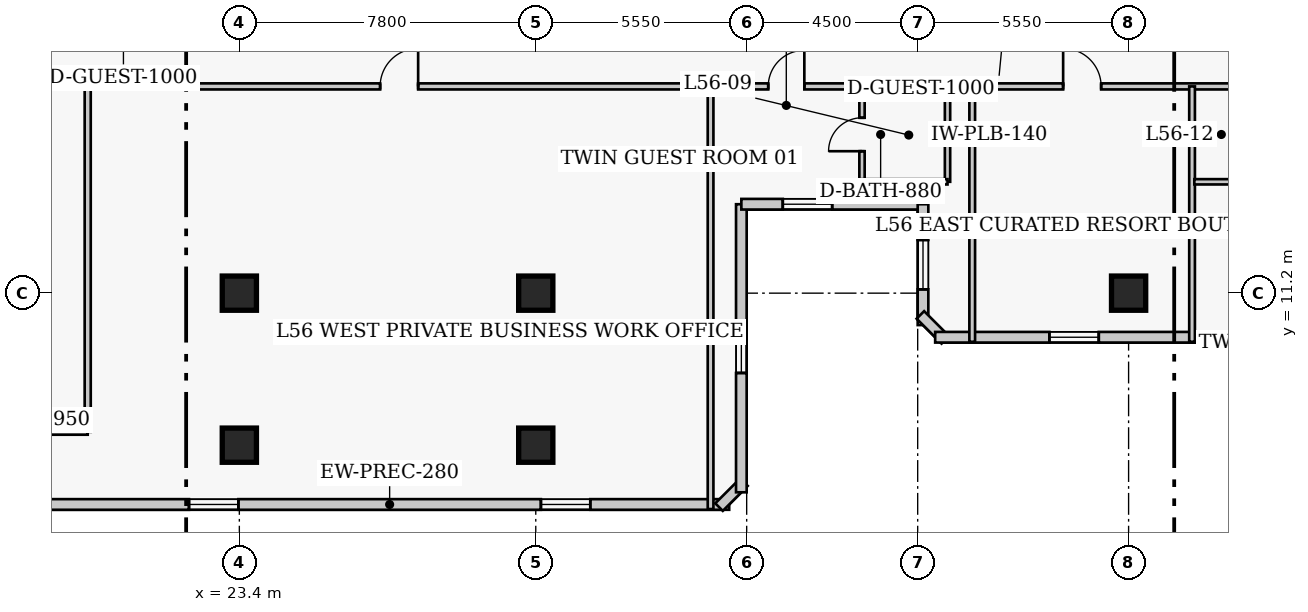
"""IFC4 building model, lengths in metres.
Left out: names, types, materials, properties, quantities, classifications, styles, units other than length and angle.
Written with IfcOpenShell. Run it as: python <this file> out.ifc"""

import sys

from ifc_helpers import new_model, si_unit, direction, frame, frame_2d, origin, origin_2d, place, context, subcontext, project, spatial, rectangle, extrude, element, fill, save


model = new_model("IFC4")
c1 = context("Model", 3, precision=1e-05, world=origin(), true_north=direction((0.0, 1.0)))
c2 = subcontext(c1, "Body", "Model", "MODEL_VIEW")
j1 = project(units=[si_unit("LENGTHUNIT", "METRE"), si_unit("PLANEANGLEUNIT", "RADIAN")], contexts=[c1])
p1 = place(None, origin())
s1 = spatial("IfcSite", under=j1, at=p1, CompositionType="ELEMENT")
p2 = place(p1, origin())
s2 = spatial("IfcBuilding", under=s1, at=p2, CompositionType="ELEMENT")
p3 = place(p2, frame((0.0, 0.0, 224.1)))
s3 = spatial("IfcBuildingStorey", under=s2, at=p3, CompositionType="ELEMENT", Elevation=224.1)
for number, where, z_axis, x_axis in (
    (1, (23.4, 11.2, 0.0), (0.0, 0.0, 1.0), (1.0, 0.0, 0.0)),
    (2, (31.2, 11.2, 0.0), (0.0, 0.0, 1.0), (1.0, 0.0, 0.0)),
    (3, (46.8, 11.2, 0.0), (0.0, 0.0, 1.0), (1.0, 0.0, 0.0)),
    (4, (23.4, 7.2, 0.0), (0.0, 0.0, 1.0), (1.0, 0.0, 0.0)),
    (5, (31.2, 7.2, 0.0), (0.0, 0.0, 1.0), (1.0, 0.0, 0.0)),
):
    element("IfcColumn", number, at=place(p3, frame(where, z_axis=z_axis, x_axis=x_axis)), inside=s3, PredefinedType="COLUMN", context=c2, shape_type="SweptSolid", body=[
        extrude(rectangle(XDim=0.9, YDim=0.9, at=origin_2d()), origin(), (0.0, 0.0, 1.0), 3.9),
    ])
p4 = place(p3, frame((10.46, 5.64, 0.0), z_axis=(0.0, 0.0, 1.0), x_axis=(1.0, 0.0, 0.0)))
e6 = element("IfcWall", 6, at=p4, inside=s3, PredefinedType="SOLIDWALL", context=c2, shape_type="SweptSolid", body=[
    extrude(rectangle(XDim=25.83, YDim=0.28, at=frame_2d((12.915, 0.0))), origin(), (0.0, 0.0, 1.0), 3.65),
])
p5 = place(p4, frame((4.305, 0.0, 0.85)))
e7 = element("IfcOpeningElement", 7, at=p5, cuts=e6, PredefinedType="OPENING", context=c2, shape_type="SweptSolid", body=[
    extrude(rectangle(XDim=1.3, YDim=1.7, at=frame_2d((0.65, 0.85))), frame((0.0, 0.15, 0.0), z_axis=(0.0, -1.0, 0.0), x_axis=(1.0, 0.0, 0.0)), (0.0, 0.0, 1.0), 0.3),
])
p6 = place(p4, frame((11.615, 0.0, 0.85)))
e8 = element("IfcOpeningElement", 8, at=p6, cuts=e6, PredefinedType="OPENING", context=c2, shape_type="SweptSolid", body=[
    extrude(rectangle(XDim=1.3, YDim=1.7, at=frame_2d((0.65, 0.85))), frame((0.0, 0.15, 0.0), z_axis=(0.0, -1.0, 0.0), x_axis=(1.0, 0.0, 0.0)), (0.0, 0.0, 1.0), 0.3),
])
p7 = place(p4, frame((20.875, 0.0, 0.85)))
e9 = element("IfcOpeningElement", 9, at=p7, cuts=e6, PredefinedType="OPENING", context=c2, shape_type="SweptSolid", body=[
    extrude(rectangle(XDim=1.3, YDim=1.7, at=frame_2d((0.65, 0.85))), frame((0.0, 0.15, 0.0), z_axis=(0.0, -1.0, 0.0), x_axis=(1.0, 0.0, 0.0)), (0.0, 0.0, 1.0), 0.3),
])
p8 = place(p3, frame((36.023, 5.571, 0.0), z_axis=(0.0, 0.0, 1.0), x_axis=(0.707106781187, 0.707106781187, 0.0)))
e10 = element("IfcWall", 10, at=p8, inside=s3, PredefinedType="SOLIDWALL", context=c2, shape_type="SweptSolid", body=[
    extrude(rectangle(XDim=0.928, YDim=0.28, at=frame_2d((0.464, 0.0))), origin(), (0.0, 0.0, 1.0), 3.65),
])
p9 = place(p3, frame((36.61, 5.96, 0.0), z_axis=(0.0, 0.0, 1.0), x_axis=(0.0, 1.0, 0.0)))
e11 = element("IfcWall", 11, at=p9, inside=s3, PredefinedType="SOLIDWALL", context=c2, shape_type="SweptSolid", body=[
    extrude(rectangle(XDim=7.58, YDim=0.28, at=frame_2d((3.79, 0.0))), origin(), (0.0, 0.0, 1.0), 3.65),
])
p10 = place(p9, frame((3.14, 0.0, 0.85)))
e12 = element("IfcOpeningElement", 12, at=p10, cuts=e11, PredefinedType="OPENING", context=c2, shape_type="SweptSolid", body=[
    extrude(rectangle(XDim=1.3, YDim=1.7, at=frame_2d((0.65, 0.85))), frame((0.0, 0.15, 0.0), z_axis=(0.0, -1.0, 0.0), x_axis=(1.0, 0.0, 0.0)), (0.0, 0.0, 1.0), 0.3),
])
p11 = place(p3, frame((36.61, 13.54, 0.0), z_axis=(0.0, 0.0, 1.0), x_axis=(1.0, 0.0, 0.0)))
e13 = element("IfcWall", 13, at=p11, inside=s3, PredefinedType="SOLIDWALL", context=c2, shape_type="SweptSolid", body=[
    extrude(rectangle(XDim=4.78, YDim=0.28, at=frame_2d((2.39, 0.0))), origin(), (0.0, 0.0, 1.0), 3.65),
])
p12 = place(p11, frame((1.09, 0.0, 0.85)))
e14 = element("IfcOpeningElement", 14, at=p12, cuts=e13, PredefinedType="OPENING", context=c2, shape_type="SweptSolid", body=[
    extrude(rectangle(XDim=1.3, YDim=1.7, at=frame_2d((0.65, 0.85))), frame((0.0, 0.15, 0.0), z_axis=(0.0, -1.0, 0.0), x_axis=(1.0, 0.0, 0.0)), (0.0, 0.0, 1.0), 0.3),
])
p13 = place(p3, frame((41.39, 13.54, 0.0), z_axis=(0.0, 0.0, 1.0), x_axis=(0.0, -1.0, 0.0)))
e15 = element("IfcWall", 15, at=p13, inside=s3, PredefinedType="SOLIDWALL", context=c2, shape_type="SweptSolid", body=[
    extrude(rectangle(XDim=3.18, YDim=0.28, at=frame_2d((1.59, 0.0))), origin(), (0.0, 0.0, 1.0), 3.65),
])
p14 = place(p13, frame((0.94, 0.0, 0.85)))
e16 = element("IfcOpeningElement", 16, at=p14, cuts=e15, PredefinedType="OPENING", context=c2, shape_type="SweptSolid", body=[
    extrude(rectangle(XDim=1.3, YDim=1.7, at=frame_2d((0.65, 0.85))), frame((0.0, 0.15, 0.0), z_axis=(0.0, -1.0, 0.0), x_axis=(1.0, 0.0, 0.0)), (0.0, 0.0, 1.0), 0.3),
])
p15 = place(p3, frame((41.321, 10.627, 0.0), z_axis=(0.0, 0.0, 1.0), x_axis=(0.707106781187, -0.707106781187, 0.0)))
e17 = element("IfcWall", 17, at=p15, inside=s3, PredefinedType="SOLIDWALL", context=c2, shape_type="SweptSolid", body=[
    extrude(rectangle(XDim=0.928, YDim=0.28, at=frame_2d((0.464, 0.0))), origin(), (0.0, 0.0, 1.0), 3.65),
])
p16 = place(p3, frame((41.71, 10.04, 0.0), z_axis=(0.0, 0.0, 1.0), x_axis=(1.0, 0.0, 0.0)))
e18 = element("IfcWall", 18, at=p16, inside=s3, PredefinedType="SOLIDWALL", context=c2, shape_type="SweptSolid", body=[
    extrude(rectangle(XDim=25.83, YDim=0.28, at=frame_2d((12.915, 0.0))), origin(), (0.0, 0.0, 1.0), 3.65),
])
p17 = place(p16, frame((3.005, 0.0, 0.85)))
e19 = element("IfcOpeningElement", 19, at=p17, cuts=e18, PredefinedType="OPENING", context=c2, shape_type="SweptSolid", body=[
    extrude(rectangle(XDim=1.3, YDim=1.7, at=frame_2d((0.65, 0.85))), frame((0.0, 0.15, 0.0), z_axis=(0.0, -1.0, 0.0), x_axis=(1.0, 0.0, 0.0)), (0.0, 0.0, 1.0), 0.3),
])
p18 = place(p16, frame((13.415, 0.0, 0.85)))
e20 = element("IfcOpeningElement", 20, at=p18, cuts=e18, PredefinedType="OPENING", context=c2, shape_type="SweptSolid", body=[
    extrude(rectangle(XDim=1.3, YDim=1.7, at=frame_2d((0.65, 0.85))), frame((0.0, 0.15, 0.0), z_axis=(0.0, -1.0, 0.0), x_axis=(1.0, 0.0, 0.0)), (0.0, 0.0, 1.0), 0.3),
])
p19 = place(p16, frame((21.525, 0.0, 0.85)))
e21 = element("IfcOpeningElement", 21, at=p19, cuts=e18, PredefinedType="OPENING", context=c2, shape_type="SweptSolid", body=[
    extrude(rectangle(XDim=1.3, YDim=1.7, at=frame_2d((0.65, 0.85))), frame((0.0, 0.15, 0.0), z_axis=(0.0, -1.0, 0.0), x_axis=(1.0, 0.0, 0.0)), (0.0, 0.0, 1.0), 0.3),
])
p20 = place(p16, frame((8.83, 0.0, 0.85)))
e22 = element("IfcOpeningElement", 22, at=p20, cuts=e18, PredefinedType="OPENING", context=c2, shape_type="SweptSolid", body=[
    extrude(rectangle(XDim=1.3, YDim=1.7, at=frame_2d((0.65, 0.85))), frame((0.0, 0.15, 0.0), z_axis=(0.0, -1.0, 0.0), x_axis=(1.0, 0.0, 0.0)), (0.0, 0.0, 1.0), 0.3),
])
p21 = place(p3, frame((19.35, 16.64, 0.0), z_axis=(0.0, 0.0, 1.0), x_axis=(1.0, 0.0, 0.0)))
e23 = element("IfcWall", 23, at=p21, inside=s3, PredefinedType="PARTITIONING", context=c2, shape_type="SweptSolid", body=[
    extrude(rectangle(XDim=16.45, YDim=0.16, at=frame_2d((8.225, 0.0))), origin(), (0.0, 0.0, 1.0), 3.65),
])
p22 = place(p21, frame((7.755, 0.0, 0.0)))
e24 = element("IfcOpeningElement", 24, at=p22, cuts=e23, PredefinedType="OPENING", context=c2, shape_type="SweptSolid", body=[
    extrude(rectangle(XDim=1.0, YDim=2.15, at=frame_2d((0.5, 1.075))), frame((0.0, 0.09, 0.0), z_axis=(0.0, -1.0, 0.0), x_axis=(1.0, 0.0, 0.0)), (0.0, 0.0, 1.0), 0.18),
])
p23 = place(p3, frame((35.8, 16.64, 0.0), z_axis=(0.0, 0.0, 1.0), x_axis=(1.0, 0.0, 0.0)))
e25 = element("IfcWall", 25, at=p23, inside=s3, PredefinedType="PARTITIONING", context=c2, shape_type="SweptSolid", body=[
    extrude(rectangle(XDim=23.2, YDim=0.16, at=frame_2d((11.6, 0.0))), origin(), (0.0, 0.0, 1.0), 3.65),
])
p24 = place(p23, frame((1.518, 0.0, 0.0)))
e26 = element("IfcOpeningElement", 26, at=p24, cuts=e25, PredefinedType="OPENING", context=c2, shape_type="SweptSolid", body=[
    extrude(rectangle(XDim=0.95, YDim=2.1, at=frame_2d((0.475, 1.05))), frame((0.0, 0.09, 0.0), z_axis=(0.0, -1.0, 0.0), x_axis=(1.0, 0.0, 0.0)), (0.0, 0.0, 1.0), 0.18),
])
p25 = place(p23, frame((9.278, 0.0, 0.0)))
e27 = element("IfcOpeningElement", 27, at=p25, cuts=e25, PredefinedType="OPENING", context=c2, shape_type="SweptSolid", body=[
    extrude(rectangle(XDim=1.0, YDim=2.15, at=frame_2d((0.5, 1.075))), frame((0.0, 0.09, 0.0), z_axis=(0.0, -1.0, 0.0), x_axis=(1.0, 0.0, 0.0)), (0.0, 0.0, 1.0), 0.18),
])
p26 = place(p23, frame((16.06, 0.0, 0.0)))
e28 = element("IfcOpeningElement", 28, at=p26, cuts=e25, PredefinedType="OPENING", context=c2, shape_type="SweptSolid", body=[
    extrude(rectangle(XDim=0.95, YDim=2.1, at=frame_2d((0.475, 1.05))), frame((0.0, 0.09, 0.0), z_axis=(0.0, -1.0, 0.0), x_axis=(1.0, 0.0, 0.0)), (0.0, 0.0, 1.0), 0.18),
])
p27 = place(p23, frame((18.985, 0.0, 0.0)))
e29 = element("IfcOpeningElement", 29, at=p27, cuts=e25, PredefinedType="OPENING", context=c2, shape_type="SweptSolid", body=[
    extrude(rectangle(XDim=0.95, YDim=2.1, at=frame_2d((0.475, 1.05))), frame((0.0, 0.09, 0.0), z_axis=(0.0, -1.0, 0.0), x_axis=(1.0, 0.0, 0.0)), (0.0, 0.0, 1.0), 0.18),
])
p28 = place(p3, frame((19.41, 7.55, 0.0), z_axis=(0.0, 0.0, 1.0), x_axis=(0.0, 1.0, 0.0)))
e30 = element("IfcWall", 30, at=p28, inside=s3, PredefinedType="PARTITIONING", context=c2, shape_type="SweptSolid", body=[
    extrude(rectangle(XDim=9.09, YDim=0.16, at=frame_2d((4.545, 0.0))), origin(), (0.0, 0.0, 1.0), 3.246),
])
p29 = place(p3, frame((17.19, 7.55, 0.0), z_axis=(0.0, 0.0, 1.0), x_axis=(1.0, 0.0, 0.0)))
e31 = element("IfcWall", 31, at=p29, inside=s3, PredefinedType="PARTITIONING", context=c2, shape_type="SweptSolid", body=[
    extrude(rectangle(XDim=2.22, YDim=0.15, at=frame_2d((1.11, 0.0))), origin(), (0.0, 0.0, 1.0), 3.65),
])
p30 = place(p3, frame((35.8, 5.52, 0.0), z_axis=(0.0, 0.0, 1.0), x_axis=(0.0, 1.0, 0.0)))
e32 = element("IfcWall", 32, at=p30, inside=s3, PredefinedType="PARTITIONING", context=c2, shape_type="SweptSolid", body=[
    extrude(rectangle(XDim=11.1, YDim=0.15, at=frame_2d((5.55, 0.0))), origin(), (0.0, 0.0, 1.0), 3.65),
])
p31 = place(p3, frame((39.785, 14.13, 0.0), z_axis=(0.0, 0.0, 1.0), x_axis=(0.0, 1.0, 0.0)))
e33 = element("IfcWall", 33, at=p31, inside=s3, PredefinedType="PLUMBINGWALL", context=c2, shape_type="SweptSolid", body=[
    extrude(rectangle(XDim=2.49, YDim=0.14, at=frame_2d((1.245, 0.0))), origin(), (0.0, 0.0, 1.0), 3.65),
])
p32 = place(p31, frame((0.805, 0.0, 0.0)))
e34 = element("IfcOpeningElement", 34, at=p32, cuts=e33, PredefinedType="OPENING", context=c2, shape_type="SweptSolid", body=[
    extrude(rectangle(XDim=0.88, YDim=2.05, at=frame_2d((0.44, 1.025))), frame((0.0, 0.08, 0.0), z_axis=(0.0, -1.0, 0.0), x_axis=(1.0, 0.0, 0.0)), (0.0, 0.0, 1.0), 0.16),
])
p33 = place(p3, frame((42.035, 14.13, 0.0), z_axis=(0.0, 0.0, 1.0), x_axis=(0.0, 1.0, 0.0)))
e35 = element("IfcWall", 35, at=p33, inside=s3, PredefinedType="PLUMBINGWALL", context=c2, shape_type="SweptSolid", body=[
    extrude(rectangle(XDim=2.49, YDim=0.14, at=frame_2d((1.245, 0.0))), origin(), (0.0, 0.0, 1.0), 3.65),
])
p34 = place(p3, frame((39.785, 14.13, 0.0), z_axis=(0.0, 0.0, 1.0), x_axis=(1.0, 0.0, 0.0)))
e36 = element("IfcWall", 36, at=p34, inside=s3, PredefinedType="PLUMBINGWALL", context=c2, shape_type="SweptSolid", body=[
    extrude(rectangle(XDim=2.25, YDim=0.14, at=frame_2d((1.125, 0.0))), origin(), (0.0, 0.0, 1.0), 3.65),
])
for number, where, z_axis, x_axis in (
    (37, (42.685, 9.92, 0.0), (0.0, 0.0, 1.0), (0.0, 1.0, 0.0)),
    (38, (48.47, 9.92, 0.0), (0.0, 0.0, 1.0), (0.0, 1.0, 0.0)),
):
    element("IfcWall", number, at=place(p3, frame(where, z_axis=z_axis, x_axis=x_axis)), inside=s3, PredefinedType="PARTITIONING", context=c2, shape_type="SweptSolid", body=[
        extrude(rectangle(XDim=6.72, YDim=0.15, at=frame_2d((3.36, 0.0))), origin(), (0.0, 0.0, 1.0), 3.65),
    ])
p35 = place(p3, frame((48.53, 14.13, 0.0), z_axis=(0.0, 0.0, 1.0), x_axis=(1.0, 0.0, 0.0)))
e39 = element("IfcWall", 39, at=p35, inside=s3, PredefinedType="PLUMBINGWALL", context=c2, shape_type="SweptSolid", body=[
    extrude(rectangle(XDim=2.25, YDim=0.14, at=frame_2d((1.125, 0.0))), origin(), (0.0, 0.0, 1.0), 3.65),
])
p36 = place(p6, origin())
e40 = element("IfcWindow", 40, at=p36, inside=s3, PartitioningType="SINGLE_PANEL", PredefinedType="WINDOW", context=c2, shape_type="SweptSolid", body=[
    extrude(rectangle(XDim=1.3, YDim=1.7, at=frame_2d((0.65, 0.85))), frame((0.0, 0.03, 0.0), z_axis=(0.0, -1.0, 0.0), x_axis=(1.0, 0.0, 0.0)), (0.0, 0.0, 1.0), 0.06),
])
fill(e8, e40)
p37 = place(p7, origin())
e41 = element("IfcWindow", 41, at=p37, inside=s3, PartitioningType="SINGLE_PANEL", PredefinedType="WINDOW", context=c2, shape_type="SweptSolid", body=[
    extrude(rectangle(XDim=1.3, YDim=1.7, at=frame_2d((0.65, 0.85))), frame((0.0, 0.03, 0.0), z_axis=(0.0, -1.0, 0.0), x_axis=(1.0, 0.0, 0.0)), (0.0, 0.0, 1.0), 0.06),
])
fill(e9, e41)
p38 = place(p10, origin())
e42 = element("IfcWindow", 42, at=p38, inside=s3, PartitioningType="SINGLE_PANEL", PredefinedType="WINDOW", context=c2, shape_type="SweptSolid", body=[
    extrude(rectangle(XDim=1.3, YDim=1.7, at=frame_2d((0.65, 0.85))), frame((0.0, 0.03, 0.0), z_axis=(0.0, -1.0, 0.0), x_axis=(1.0, 0.0, 0.0)), (0.0, 0.0, 1.0), 0.06),
])
fill(e12, e42)
p39 = place(p12, origin())
e43 = element("IfcWindow", 43, at=p39, inside=s3, PartitioningType="SINGLE_PANEL", PredefinedType="WINDOW", context=c2, shape_type="SweptSolid", body=[
    extrude(rectangle(XDim=1.3, YDim=1.7, at=frame_2d((0.65, 0.85))), frame((0.0, 0.03, 0.0), z_axis=(0.0, -1.0, 0.0), x_axis=(1.0, 0.0, 0.0)), (0.0, 0.0, 1.0), 0.06),
])
fill(e14, e43)
p40 = place(p14, origin())
e44 = element("IfcWindow", 44, at=p40, inside=s3, PartitioningType="SINGLE_PANEL", PredefinedType="WINDOW", context=c2, shape_type="SweptSolid", body=[
    extrude(rectangle(XDim=1.3, YDim=1.7, at=frame_2d((0.65, 0.85))), frame((0.0, 0.03, 0.0), z_axis=(0.0, -1.0, 0.0), x_axis=(1.0, 0.0, 0.0)), (0.0, 0.0, 1.0), 0.06),
])
fill(e16, e44)
p41 = place(p17, origin())
e45 = element("IfcWindow", 45, at=p41, inside=s3, PartitioningType="SINGLE_PANEL", PredefinedType="WINDOW", context=c2, shape_type="SweptSolid", body=[
    extrude(rectangle(XDim=1.3, YDim=1.7, at=frame_2d((0.65, 0.85))), frame((0.0, 0.03, 0.0), z_axis=(0.0, -1.0, 0.0), x_axis=(1.0, 0.0, 0.0)), (0.0, 0.0, 1.0), 0.06),
])
fill(e19, e45)
p42 = place(p22, origin())
e46 = element("IfcDoor", 46, at=p42, inside=s3, OperationType="SINGLE_SWING_RIGHT", PredefinedType="DOOR", context=c2, shape_type="SweptSolid", body=[
    extrude(rectangle(XDim=1.0, YDim=2.15, at=frame_2d((0.5, 1.075))), frame((0.0, 0.025, 0.0), z_axis=(0.0, -1.0, 0.0), x_axis=(1.0, 0.0, 0.0)), (0.0, 0.0, 1.0), 0.05),
])
fill(e24, e46)
p43 = place(p32, origin())
e47 = element("IfcDoor", 47, at=p43, inside=s3, OperationType="SINGLE_SWING_LEFT", PredefinedType="DOOR", context=c2, shape_type="SweptSolid", body=[
    extrude(rectangle(XDim=0.88, YDim=2.05, at=frame_2d((0.44, 1.025))), frame((0.0, 0.025, 0.0), z_axis=(0.0, -1.0, 0.0), x_axis=(1.0, 0.0, 0.0)), (0.0, 0.0, 1.0), 0.05),
])
fill(e34, e47)
p44 = place(p24, origin())
e48 = element("IfcDoor", 48, at=p44, inside=s3, OperationType="SINGLE_SWING_RIGHT", PredefinedType="DOOR", context=c2, shape_type="SweptSolid", body=[
    extrude(rectangle(XDim=0.95, YDim=2.1, at=frame_2d((0.475, 1.05))), frame((0.0, 0.025, 0.0), z_axis=(0.0, -1.0, 0.0), x_axis=(1.0, 0.0, 0.0)), (0.0, 0.0, 1.0), 0.05),
])
fill(e26, e48)
p45 = place(p25, origin())
e49 = element("IfcDoor", 49, at=p45, inside=s3, OperationType="SINGLE_SWING_LEFT", PredefinedType="DOOR", context=c2, shape_type="SweptSolid", body=[
    extrude(rectangle(XDim=1.0, YDim=2.15, at=frame_2d((0.5, 1.075))), frame((0.0, 0.025, 0.0), z_axis=(0.0, -1.0, 0.0), x_axis=(1.0, 0.0, 0.0)), (0.0, 0.0, 1.0), 0.05),
])
fill(e27, e49)
save(model, sys.argv[1])
